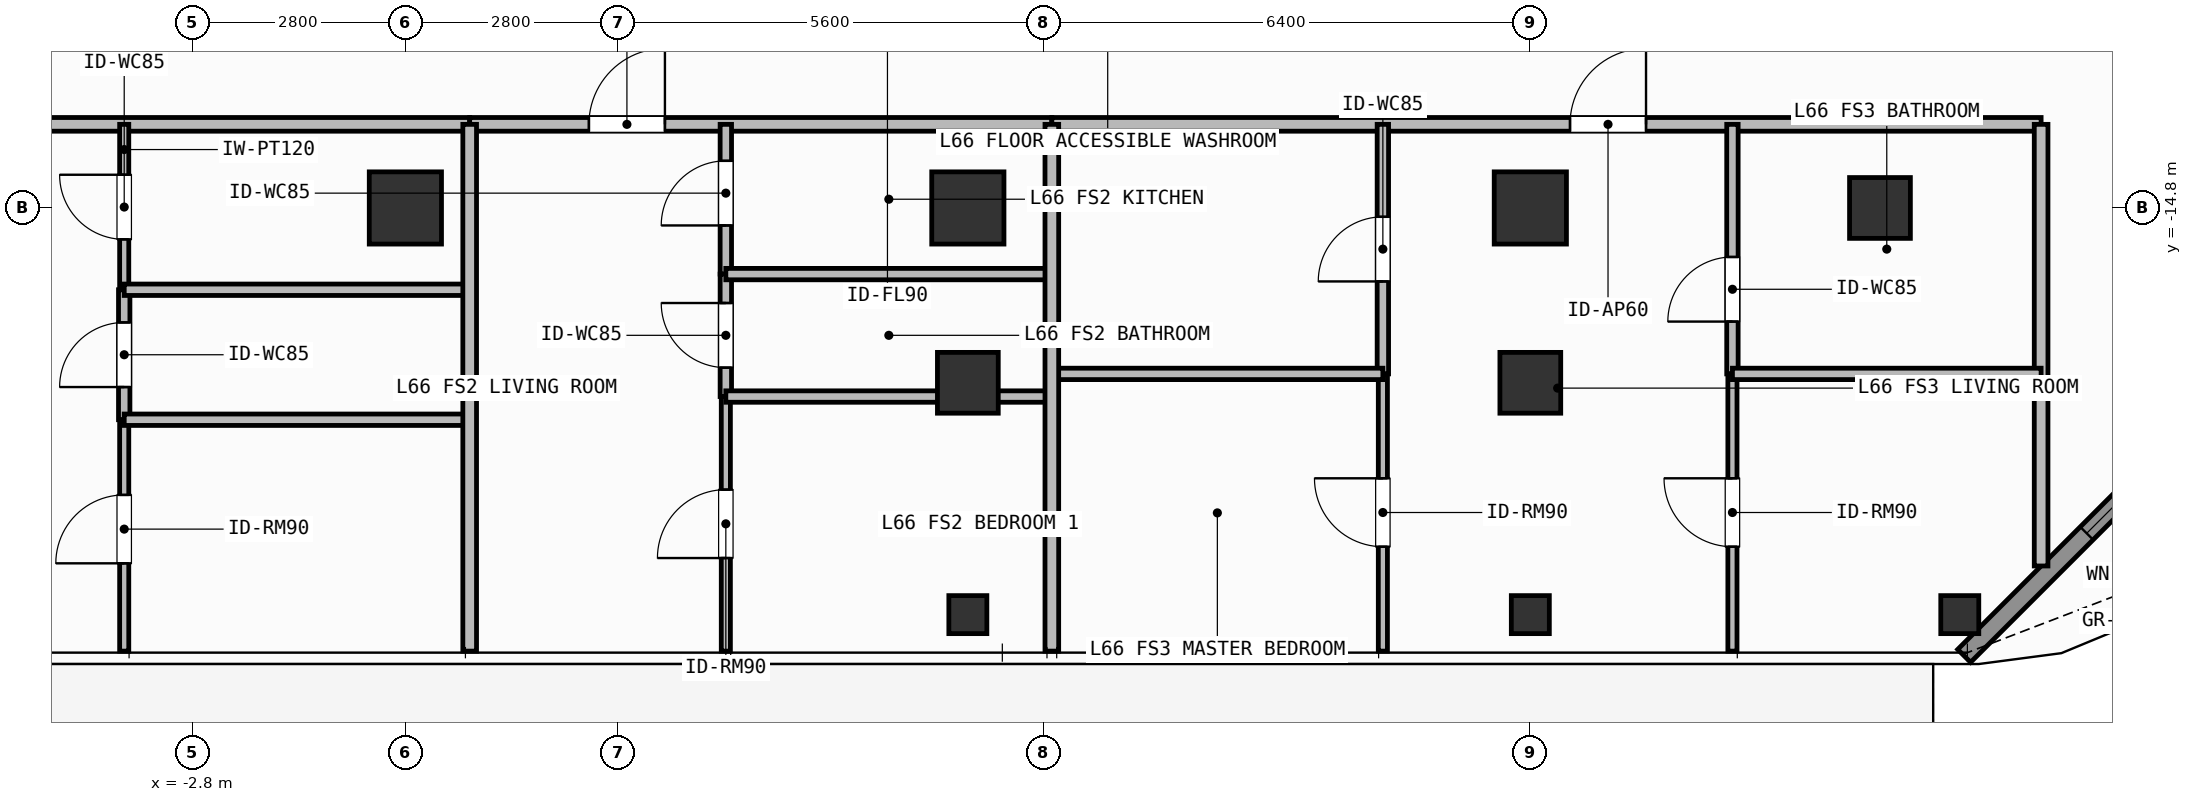
"""IFC4 building model, lengths in metres.
Left out: names, types, materials, properties, quantities, classifications, styles, units other than length and angle.
Written with IfcOpenShell. Run it as: python <this file> out.ifc"""

import sys

from ifc_helpers import new_model, si_unit, direction, frame, frame_2d, origin, origin_2d, place, context, subcontext, project, spatial, rectangle, hollow_rectangle, extrude, element, fill, save


model = new_model("IFC4")
c1 = context("Model", 3, precision=1e-05, world=origin(), true_north=direction((0.0, 1.0)))
c2 = subcontext(c1, "Body", "Model", "MODEL_VIEW")
j1 = project(units=[si_unit("LENGTHUNIT", "METRE"), si_unit("PLANEANGLEUNIT", "RADIAN")], contexts=[c1])
p1 = place(None, origin())
s1 = spatial("IfcSite", under=j1, at=p1, CompositionType="ELEMENT")
p2 = place(p1, origin())
s2 = spatial("IfcBuilding", under=s1, at=p2, CompositionType="ELEMENT")
p3 = place(p2, frame((0.0, 0.0, 270.3)))
s3 = spatial("IfcBuildingStorey", under=s2, at=p3, CompositionType="ELEMENT", Elevation=270.3)
for number, where, z_axis, x_axis in (
    (1, (0.0, -14.8, 0.0), (0.0, 0.0, 1.0), (1.0, 0.0, 0.0)),
    (2, (7.4, -14.8, 0.0), (0.0, 0.0, 1.0), (1.0, 0.0, 0.0)),
    (3, (14.8, -14.8, 0.0), (0.0, 0.0, 1.0), (1.0, 0.0, 0.0)),
):
    element("IfcColumn", number, at=place(p3, frame(where, z_axis=z_axis, x_axis=x_axis)), inside=s3, PredefinedType="COLUMN", context=c2, shape_type="SweptSolid", body=[
        extrude(rectangle(XDim=0.95, YDim=0.95, at=origin_2d()), origin(), (0.0, 0.0, 1.0), 3.9),
    ])
for number, where, z_axis, x_axis in (
    (4, (19.4, -14.8, 0.0), (0.0, 0.0, 1.0), (1.0, 0.0, 0.0)),
    (5, (7.4, -17.1, 0.0), (0.0, 0.0, 1.0), (1.0, 0.0, 0.0)),
    (6, (14.8, -17.1, 0.0), (0.0, 0.0, 1.0), (1.0, 0.0, 0.0)),
):
    element("IfcColumn", number, at=place(p3, frame(where, z_axis=z_axis, x_axis=x_axis)), inside=s3, PredefinedType="COLUMN", context=c2, shape_type="SweptSolid", body=[
        extrude(hollow_rectangle(XDim=0.8, YDim=0.8, WallThickness=0.036, at=origin_2d()), origin(), (0.0, 0.0, 1.0), 3.9),
    ])
for number, where, z_axis, x_axis in (
    (7, (20.45, -20.15, 0.0), (0.0, 0.0, 1.0), (1.0, 0.0, 0.0)),
    (8, (7.4, -20.15, 0.0), (0.0, 0.0, 1.0), (1.0, 0.0, 0.0)),
    (9, (14.8, -20.15, 0.0), (0.0, 0.0, 1.0), (1.0, 0.0, 0.0)),
):
    element("IfcColumn", number, at=place(p3, frame(where, z_axis=z_axis, x_axis=x_axis)), inside=s3, PredefinedType="COLUMN", context=c2, shape_type="SweptSolid", body=[
        extrude(hollow_rectangle(XDim=0.5, YDim=0.5, WallThickness=0.025, at=origin_2d()), origin(), (0.0, 0.0, 1.0), 3.9),
    ])
p4 = place(p3, frame((24.792, -16.408, 0.0), z_axis=(0.0, 0.0, 1.0), x_axis=(-0.707126925818, -0.707086635981, 0.0)))
e10 = element("IfcWall", 10, at=p4, inside=s3, PredefinedType="SOLIDWALL", context=c2, shape_type="SweptSolid", body=[
    extrude(rectangle(XDim=6.06, YDim=0.24, at=frame_2d((3.03, 0.0))), origin(), (0.0, 0.0, 1.0), 3.68),
])
p5 = place(p4, frame((2.28, 0.0, 0.8)))
e11 = element("IfcOpeningElement", 11, at=p5, cuts=e10, PredefinedType="OPENING", context=c2, shape_type="SweptSolid", body=[
    extrude(rectangle(XDim=1.5, YDim=1.85, at=frame_2d((0.75, 0.925))), frame((0.0, 0.13, 0.0), z_axis=(0.0, -1.0, 0.0), x_axis=(1.0, 0.0, 0.0)), (0.0, 0.0, 1.0), 0.26),
])
p6 = place(p3, frame((-13.72, -13.7, 0.0), z_axis=(0.0, 0.0, 1.0), x_axis=(1.0, 0.0, 0.0)))
e12 = element("IfcWall", 12, at=p6, inside=s3, PredefinedType="PARTITIONING", context=c2, shape_type="SweptSolid", body=[
    extrude(rectangle(XDim=14.566, YDim=0.18, at=frame_2d((7.283, 0.0))), origin(), (0.0, 0.0, 1.0), 3.68),
])
p7 = place(p6, frame((6.962, 0.0, 0.0)))
e13 = element("IfcOpeningElement", 13, at=p7, cuts=e12, PredefinedType="OPENING", context=c2, shape_type="SweptSolid", body=[
    extrude(rectangle(XDim=1.0, YDim=2.2, at=frame_2d((0.5, 1.1))), frame((0.0, 0.1, 0.0), z_axis=(0.0, -1.0, 0.0), x_axis=(1.0, 0.0, 0.0)), (0.0, 0.0, 1.0), 0.2),
])
p8 = place(p3, frame((-3.699, -17.586, 0.0), z_axis=(0.0, 0.0, 1.0), x_axis=(0.0, 1.0, 0.0)))
e14 = element("IfcWall", 14, at=p8, inside=s3, PredefinedType="PARTITIONING", context=c2, shape_type="SweptSolid", body=[
    extrude(rectangle(XDim=1.71, YDim=0.15, at=frame_2d((0.855, 0.0))), origin(), (0.0, 0.0, 1.0), 3.68),
])
p9 = place(p8, frame((0.43, 0.0, 0.0)))
e15 = element("IfcOpeningElement", 15, at=p9, cuts=e14, PredefinedType="OPENING", context=c2, shape_type="SweptSolid", body=[
    extrude(rectangle(XDim=0.85, YDim=2.1, at=frame_2d((0.425, 1.05))), frame((0.0, 0.085, 0.0), z_axis=(0.0, -1.0, 0.0), x_axis=(1.0, 0.0, 0.0)), (0.0, 0.0, 1.0), 0.17),
])
p10 = place(p3, frame((-3.699, -15.876, 0.0), z_axis=(0.0, 0.0, 1.0), x_axis=(0.0, 1.0, 0.0)))
e16 = element("IfcWall", 16, at=p10, inside=s3, PredefinedType="PARTITIONING", context=c2, shape_type="SweptSolid", body=[
    extrude(rectangle(XDim=2.176, YDim=0.12, at=frame_2d((1.088, 0.0))), origin(), (0.0, 0.0, 1.0), 3.68),
])
p11 = place(p10, frame((0.663, 0.0, 0.0)))
e17 = element("IfcOpeningElement", 17, at=p11, cuts=e16, PredefinedType="OPENING", context=c2, shape_type="SweptSolid", body=[
    extrude(rectangle(XDim=0.85, YDim=2.1, at=frame_2d((0.425, 1.05))), frame((0.0, 0.07, 0.0), z_axis=(0.0, -1.0, 0.0), x_axis=(1.0, 0.0, 0.0)), (0.0, 0.0, 1.0), 0.14),
])
p12 = place(p3, frame((-3.699, -20.63, 0.0), z_axis=(0.0, 0.0, 1.0), x_axis=(0.0, 1.0, 0.0)))
e18 = element("IfcWall", 18, at=p12, inside=s3, PredefinedType="PARTITIONING", context=c2, shape_type="SweptSolid", body=[
    extrude(rectangle(XDim=3.044, YDim=0.12, at=frame_2d((1.522, 0.0))), origin(), (0.0, 0.0, 1.0), 3.68),
])
p13 = place(p12, frame((1.155, 0.0, 0.0)))
e19 = element("IfcOpeningElement", 19, at=p13, cuts=e18, PredefinedType="OPENING", context=c2, shape_type="SweptSolid", body=[
    extrude(rectangle(XDim=0.9, YDim=2.1, at=frame_2d((0.45, 1.05))), frame((0.0, 0.07, 0.0), z_axis=(0.0, -1.0, 0.0), x_axis=(1.0, 0.0, 0.0)), (0.0, 0.0, 1.0), 0.14),
])
p14 = place(p3, frame((0.846, -13.7, 0.0), z_axis=(0.0, 0.0, 1.0), x_axis=(1.0, 0.0, 0.0)))
e20 = element("IfcWall", 20, at=p14, inside=s3, PredefinedType="PARTITIONING", context=c2, shape_type="SweptSolid", body=[
    extrude(rectangle(XDim=7.659, YDim=0.18, at=frame_2d((3.83, 0.0))), origin(), (0.0, 0.0, 1.0), 3.68),
])
p15 = place(p14, frame((1.569, 0.0, 0.0)))
e21 = element("IfcOpeningElement", 21, at=p15, cuts=e20, PredefinedType="OPENING", context=c2, shape_type="SweptSolid", body=[
    extrude(rectangle(XDim=1.0, YDim=2.2, at=frame_2d((0.5, 1.1))), frame((0.0, 0.1, 0.0), z_axis=(0.0, -1.0, 0.0), x_axis=(1.0, 0.0, 0.0)), (0.0, 0.0, 1.0), 0.2),
])
p16 = place(p3, frame((4.216, -15.67, 0.0), z_axis=(0.0, 0.0, 1.0), x_axis=(0.0, 1.0, 0.0)))
e22 = element("IfcWall", 22, at=p16, inside=s3, PredefinedType="PARTITIONING", context=c2, shape_type="SweptSolid", body=[
    extrude(rectangle(XDim=1.97, YDim=0.15, at=frame_2d((0.985, 0.0))), origin(), (0.0, 0.0, 1.0), 3.68),
])
p17 = place(p16, frame((0.64, 0.0, 0.0)))
e23 = element("IfcOpeningElement", 23, at=p17, cuts=e22, PredefinedType="OPENING", context=c2, shape_type="SweptSolid", body=[
    extrude(rectangle(XDim=0.85, YDim=2.1, at=frame_2d((0.425, 1.05))), frame((0.0, 0.085, 0.0), z_axis=(0.0, -1.0, 0.0), x_axis=(1.0, 0.0, 0.0)), (0.0, 0.0, 1.0), 0.17),
])
p18 = place(p3, frame((4.216, -17.281, 0.0), z_axis=(0.0, 0.0, 1.0), x_axis=(0.0, 1.0, 0.0)))
e24 = element("IfcWall", 24, at=p18, inside=s3, PredefinedType="PARTITIONING", context=c2, shape_type="SweptSolid", body=[
    extrude(rectangle(XDim=1.611, YDim=0.15, at=frame_2d((0.806, 0.0))), origin(), (0.0, 0.0, 1.0), 3.68),
])
p19 = place(p18, frame((0.381, 0.0, 0.0)))
e25 = element("IfcOpeningElement", 25, at=p19, cuts=e24, PredefinedType="OPENING", context=c2, shape_type="SweptSolid", body=[
    extrude(rectangle(XDim=0.85, YDim=2.1, at=frame_2d((0.425, 1.05))), frame((0.0, 0.085, 0.0), z_axis=(0.0, -1.0, 0.0), x_axis=(1.0, 0.0, 0.0)), (0.0, 0.0, 1.0), 0.17),
])
p20 = place(p3, frame((4.216, -20.63, 0.0), z_axis=(0.0, 0.0, 1.0), x_axis=(0.0, 1.0, 0.0)))
e26 = element("IfcWall", 26, at=p20, inside=s3, PredefinedType="PARTITIONING", context=c2, shape_type="SweptSolid", body=[
    extrude(rectangle(XDim=3.349, YDim=0.12, at=frame_2d((1.674, 0.0))), origin(), (0.0, 0.0, 1.0), 3.68),
])
p21 = place(p20, frame((1.225, 0.0, 0.0)))
e27 = element("IfcOpeningElement", 27, at=p21, cuts=e26, PredefinedType="OPENING", context=c2, shape_type="SweptSolid", body=[
    extrude(rectangle(XDim=0.9, YDim=2.1, at=frame_2d((0.45, 1.05))), frame((0.0, 0.07, 0.0), z_axis=(0.0, -1.0, 0.0), x_axis=(1.0, 0.0, 0.0)), (0.0, 0.0, 1.0), 0.14),
])
p22 = place(p3, frame((8.505, -13.7, 0.0), z_axis=(0.0, 0.0, 1.0), x_axis=(1.0, 0.0, 0.0)))
e28 = element("IfcWall", 28, at=p22, inside=s3, PredefinedType="PARTITIONING", context=c2, shape_type="SweptSolid", body=[
    extrude(rectangle(XDim=13.015, YDim=0.18, at=frame_2d((6.508, 0.0))), origin(), (0.0, 0.0, 1.0), 3.68),
])
p23 = place(p22, frame((6.817, 0.0, 0.0)))
e29 = element("IfcOpeningElement", 29, at=p23, cuts=e28, PredefinedType="OPENING", context=c2, shape_type="SweptSolid", body=[
    extrude(rectangle(XDim=1.0, YDim=2.2, at=frame_2d((0.5, 1.1))), frame((0.0, 0.1, 0.0), z_axis=(0.0, -1.0, 0.0), x_axis=(1.0, 0.0, 0.0)), (0.0, 0.0, 1.0), 0.2),
])
p24 = place(p3, frame((12.86, -16.983, 0.0), z_axis=(0.0, 0.0, 1.0), x_axis=(0.0, 1.0, 0.0)))
e30 = element("IfcWall", 30, at=p24, inside=s3, PredefinedType="PARTITIONING", context=c2, shape_type="SweptSolid", body=[
    extrude(rectangle(XDim=3.283, YDim=0.15, at=frame_2d((1.642, 0.0))), origin(), (0.0, 0.0, 1.0), 3.68),
])
p25 = place(p24, frame((1.217, 0.0, 0.0)))
e31 = element("IfcOpeningElement", 31, at=p25, cuts=e30, PredefinedType="OPENING", context=c2, shape_type="SweptSolid", body=[
    extrude(rectangle(XDim=0.85, YDim=2.1, at=frame_2d((0.425, 1.05))), frame((0.0, 0.085, 0.0), z_axis=(0.0, -1.0, 0.0), x_axis=(1.0, 0.0, 0.0)), (0.0, 0.0, 1.0), 0.17),
])
p26 = place(p3, frame((12.86, -20.63, 0.0), z_axis=(0.0, 0.0, 1.0), x_axis=(0.0, 1.0, 0.0)))
e32 = element("IfcWall", 32, at=p26, inside=s3, PredefinedType="PARTITIONING", context=c2, shape_type="SweptSolid", body=[
    extrude(rectangle(XDim=3.647, YDim=0.12, at=frame_2d((1.823, 0.0))), origin(), (0.0, 0.0, 1.0), 3.68),
])
p27 = place(p26, frame((1.374, 0.0, 0.0)))
e33 = element("IfcOpeningElement", 33, at=p27, cuts=e32, PredefinedType="OPENING", context=c2, shape_type="SweptSolid", body=[
    extrude(rectangle(XDim=0.9, YDim=2.1, at=frame_2d((0.45, 1.05))), frame((0.0, 0.07, 0.0), z_axis=(0.0, -1.0, 0.0), x_axis=(1.0, 0.0, 0.0)), (0.0, 0.0, 1.0), 0.14),
])
p28 = place(p3, frame((17.459, -16.983, 0.0), z_axis=(0.0, 0.0, 1.0), x_axis=(0.0, 1.0, 0.0)))
e34 = element("IfcWall", 34, at=p28, inside=s3, PredefinedType="PARTITIONING", context=c2, shape_type="SweptSolid", body=[
    extrude(rectangle(XDim=3.283, YDim=0.15, at=frame_2d((1.642, 0.0))), origin(), (0.0, 0.0, 1.0), 3.68),
])
p29 = place(p28, frame((0.688, 0.0, 0.0)))
e35 = element("IfcOpeningElement", 35, at=p29, cuts=e34, PredefinedType="OPENING", context=c2, shape_type="SweptSolid", body=[
    extrude(rectangle(XDim=0.85, YDim=2.1, at=frame_2d((0.425, 1.05))), frame((0.0, 0.085, 0.0), z_axis=(0.0, -1.0, 0.0), x_axis=(1.0, 0.0, 0.0)), (0.0, 0.0, 1.0), 0.17),
])
p30 = place(p3, frame((17.459, -20.63, 0.0), z_axis=(0.0, 0.0, 1.0), x_axis=(0.0, 1.0, 0.0)))
e36 = element("IfcWall", 36, at=p30, inside=s3, PredefinedType="PARTITIONING", context=c2, shape_type="SweptSolid", body=[
    extrude(rectangle(XDim=3.647, YDim=0.12, at=frame_2d((1.823, 0.0))), origin(), (0.0, 0.0, 1.0), 3.68),
])
p31 = place(p30, frame((1.374, 0.0, 0.0)))
e37 = element("IfcOpeningElement", 37, at=p31, cuts=e36, PredefinedType="OPENING", context=c2, shape_type="SweptSolid", body=[
    extrude(rectangle(XDim=0.9, YDim=2.1, at=frame_2d((0.45, 1.05))), frame((0.0, 0.07, 0.0), z_axis=(0.0, -1.0, 0.0), x_axis=(1.0, 0.0, 0.0)), (0.0, 0.0, 1.0), 0.14),
])
p32 = place(p3, frame((21.52, -19.51, 0.0), z_axis=(0.0, 0.0, 1.0), x_axis=(0.0, 1.0, 0.0)))
e38 = element("IfcWall", 38, at=p32, inside=s3, PredefinedType="PARTITIONING", context=c2, shape_type="SweptSolid", body=[
    extrude(rectangle(XDim=5.81, YDim=0.18, at=frame_2d((2.905, 0.0))), origin(), (0.0, 0.0, 1.0), 3.68),
])
for number, where, z_axis, x_axis in (
    (39, (-3.699, -15.876, 0.0), (0.0, 0.0, 1.0), (1.0, 0.0, 0.0)),
    (40, (-3.699, -17.586, 0.0), (0.0, 0.0, 1.0), (1.0, 0.0, 0.0)),
):
    element("IfcWall", number, at=place(p3, frame(where, z_axis=z_axis, x_axis=x_axis)), inside=s3, PredefinedType="PARTITIONING", context=c2, shape_type="SweptSolid", body=[
        extrude(rectangle(XDim=4.545, YDim=0.15, at=frame_2d((2.272, 0.0))), origin(), (0.0, 0.0, 1.0), 3.68),
    ])
p33 = place(p3, frame((4.216, -15.67, 0.0), z_axis=(0.0, 0.0, 1.0), x_axis=(1.0, 0.0, 0.0)))
e41 = element("IfcWall", 41, at=p33, inside=s3, PredefinedType="PARTITIONING", context=c2, shape_type="SweptSolid", body=[
    extrude(rectangle(XDim=4.289, YDim=0.15, at=frame_2d((2.145, 0.0))), origin(), (0.0, 0.0, 1.0), 3.68),
])
p34 = place(p3, frame((4.216, -17.281, 0.0), z_axis=(0.0, 0.0, 1.0), x_axis=(1.0, 0.0, 0.0)))
e42 = element("IfcWall", 42, at=p34, inside=s3, PredefinedType="PARTITIONING", context=c2, shape_type="SweptSolid", body=[
    extrude(rectangle(XDim=4.289, YDim=0.15, at=frame_2d((2.145, 0.0))), origin(), (0.0, 0.0, 1.0), 3.182),
])
p35 = place(p3, frame((0.846, -20.63, 0.0), z_axis=(0.0, 0.0, 1.0), x_axis=(0.0, 1.0, 0.0)))
e43 = element("IfcWall", 43, at=p35, inside=s3, PredefinedType="PARTITIONING", context=c2, shape_type="SweptSolid", body=[
    extrude(rectangle(XDim=6.93, YDim=0.18, at=frame_2d((3.465, 0.0))), origin(), (0.0, 0.0, 1.0), 3.68),
])
p36 = place(p3, frame((8.505, -16.983, 0.0), z_axis=(0.0, 0.0, 1.0), x_axis=(1.0, 0.0, 0.0)))
e44 = element("IfcWall", 44, at=p36, inside=s3, PredefinedType="PARTITIONING", context=c2, shape_type="SweptSolid", body=[
    extrude(rectangle(XDim=4.355, YDim=0.15, at=frame_2d((2.178, 0.0))), origin(), (0.0, 0.0, 1.0), 3.182),
])
p37 = place(p3, frame((17.459, -16.983, 0.0), z_axis=(0.0, 0.0, 1.0), x_axis=(1.0, 0.0, 0.0)))
e45 = element("IfcWall", 45, at=p37, inside=s3, PredefinedType="PARTITIONING", context=c2, shape_type="SweptSolid", body=[
    extrude(rectangle(XDim=4.061, YDim=0.15, at=frame_2d((2.031, 0.0))), origin(), (0.0, 0.0, 1.0), 3.68),
])
p38 = place(p3, frame((8.505, -20.63, 0.0), z_axis=(0.0, 0.0, 1.0), x_axis=(0.0, 1.0, 0.0)))
e46 = element("IfcWall", 46, at=p38, inside=s3, PredefinedType="PARTITIONING", context=c2, shape_type="SweptSolid", body=[
    extrude(rectangle(XDim=6.93, YDim=0.18, at=frame_2d((3.465, 0.0))), origin(), (0.0, 0.0, 1.0), 3.68),
])
p39 = place(p5, origin())
e47 = element("IfcWindow", 47, at=p39, inside=s3, PartitioningType="SINGLE_PANEL", PredefinedType="WINDOW", context=c2, shape_type="SweptSolid", body=[
    extrude(rectangle(XDim=1.5, YDim=1.85, at=frame_2d((0.75, 0.925))), frame((0.0, 0.03, 0.0), z_axis=(0.0, -1.0, 0.0), x_axis=(1.0, 0.0, 0.0)), (0.0, 0.0, 1.0), 0.06),
])
fill(e11, e47)
p40 = place(p9, origin())
e48 = element("IfcDoor", 48, at=p40, inside=s3, OperationType="SINGLE_SWING_LEFT", PredefinedType="DOOR", context=c2, shape_type="SweptSolid", body=[
    extrude(rectangle(XDim=0.85, YDim=2.1, at=frame_2d((0.425, 1.05))), frame((0.0, 0.025, 0.0), z_axis=(0.0, -1.0, 0.0), x_axis=(1.0, 0.0, 0.0)), (0.0, 0.0, 1.0), 0.05),
])
fill(e15, e48)
p41 = place(p11, origin())
e49 = element("IfcDoor", 49, at=p41, inside=s3, OperationType="SINGLE_SWING_RIGHT", PredefinedType="DOOR", context=c2, shape_type="SweptSolid", body=[
    extrude(rectangle(XDim=0.85, YDim=2.1, at=frame_2d((0.425, 1.05))), frame((0.0, 0.025, 0.0), z_axis=(0.0, -1.0, 0.0), x_axis=(1.0, 0.0, 0.0)), (0.0, 0.0, 1.0), 0.05),
])
fill(e17, e49)
p42 = place(p13, origin())
e50 = element("IfcDoor", 50, at=p42, inside=s3, OperationType="SINGLE_SWING_LEFT", PredefinedType="DOOR", context=c2, shape_type="SweptSolid", body=[
    extrude(rectangle(XDim=0.9, YDim=2.1, at=frame_2d((0.45, 1.05))), frame((0.0, 0.025, 0.0), z_axis=(0.0, -1.0, 0.0), x_axis=(1.0, 0.0, 0.0)), (0.0, 0.0, 1.0), 0.05),
])
fill(e19, e50)
p43 = place(p15, origin())
e51 = element("IfcDoor", 51, at=p43, inside=s3, OperationType="SINGLE_SWING_RIGHT", PredefinedType="DOOR", context=c2, shape_type="SweptSolid", body=[
    extrude(rectangle(XDim=1.0, YDim=2.2, at=frame_2d((0.5, 1.1))), frame((0.0, 0.025, 0.0), z_axis=(0.0, -1.0, 0.0), x_axis=(1.0, 0.0, 0.0)), (0.0, 0.0, 1.0), 0.05),
])
fill(e21, e51)
p44 = place(p17, origin())
e52 = element("IfcDoor", 52, at=p44, inside=s3, OperationType="SINGLE_SWING_LEFT", PredefinedType="DOOR", context=c2, shape_type="SweptSolid", body=[
    extrude(rectangle(XDim=0.85, YDim=2.1, at=frame_2d((0.425, 1.05))), frame((0.0, 0.025, 0.0), z_axis=(0.0, -1.0, 0.0), x_axis=(1.0, 0.0, 0.0)), (0.0, 0.0, 1.0), 0.05),
])
fill(e23, e52)
p45 = place(p19, origin())
e53 = element("IfcDoor", 53, at=p45, inside=s3, OperationType="SINGLE_SWING_RIGHT", PredefinedType="DOOR", context=c2, shape_type="SweptSolid", body=[
    extrude(rectangle(XDim=0.85, YDim=2.1, at=frame_2d((0.425, 1.05))), frame((0.0, 0.025, 0.0), z_axis=(0.0, -1.0, 0.0), x_axis=(1.0, 0.0, 0.0)), (0.0, 0.0, 1.0), 0.05),
])
fill(e25, e53)
p46 = place(p21, origin())
e54 = element("IfcDoor", 54, at=p46, inside=s3, OperationType="SINGLE_SWING_LEFT", PredefinedType="DOOR", context=c2, shape_type="SweptSolid", body=[
    extrude(rectangle(XDim=0.9, YDim=2.1, at=frame_2d((0.45, 1.05))), frame((0.0, 0.025, 0.0), z_axis=(0.0, -1.0, 0.0), x_axis=(1.0, 0.0, 0.0)), (0.0, 0.0, 1.0), 0.05),
])
fill(e27, e54)
p47 = place(p23, origin())
e55 = element("IfcDoor", 55, at=p47, inside=s3, OperationType="SINGLE_SWING_RIGHT", PredefinedType="DOOR", context=c2, shape_type="SweptSolid", body=[
    extrude(rectangle(XDim=1.0, YDim=2.2, at=frame_2d((0.5, 1.1))), frame((0.0, 0.025, 0.0), z_axis=(0.0, -1.0, 0.0), x_axis=(1.0, 0.0, 0.0)), (0.0, 0.0, 1.0), 0.05),
])
fill(e29, e55)
p48 = place(p25, origin())
e56 = element("IfcDoor", 56, at=p48, inside=s3, OperationType="SINGLE_SWING_LEFT", PredefinedType="DOOR", context=c2, shape_type="SweptSolid", body=[
    extrude(rectangle(XDim=0.85, YDim=2.1, at=frame_2d((0.425, 1.05))), frame((0.0, 0.025, 0.0), z_axis=(0.0, -1.0, 0.0), x_axis=(1.0, 0.0, 0.0)), (0.0, 0.0, 1.0), 0.05),
])
fill(e31, e56)
p49 = place(p27, origin())
e57 = element("IfcDoor", 57, at=p49, inside=s3, OperationType="SINGLE_SWING_RIGHT", PredefinedType="DOOR", context=c2, shape_type="SweptSolid", body=[
    extrude(rectangle(XDim=0.9, YDim=2.1, at=frame_2d((0.45, 1.05))), frame((0.0, 0.025, 0.0), z_axis=(0.0, -1.0, 0.0), x_axis=(1.0, 0.0, 0.0)), (0.0, 0.0, 1.0), 0.05),
])
fill(e33, e57)
p50 = place(p29, origin())
e58 = element("IfcDoor", 58, at=p50, inside=s3, OperationType="SINGLE_SWING_LEFT", PredefinedType="DOOR", context=c2, shape_type="SweptSolid", body=[
    extrude(rectangle(XDim=0.85, YDim=2.1, at=frame_2d((0.425, 1.05))), frame((0.0, 0.025, 0.0), z_axis=(0.0, -1.0, 0.0), x_axis=(1.0, 0.0, 0.0)), (0.0, 0.0, 1.0), 0.05),
])
fill(e35, e58)
p51 = place(p31, origin())
e59 = element("IfcDoor", 59, at=p51, inside=s3, OperationType="SINGLE_SWING_RIGHT", PredefinedType="DOOR", context=c2, shape_type="SweptSolid", body=[
    extrude(rectangle(XDim=0.9, YDim=2.1, at=frame_2d((0.45, 1.05))), frame((0.0, 0.025, 0.0), z_axis=(0.0, -1.0, 0.0), x_axis=(1.0, 0.0, 0.0)), (0.0, 0.0, 1.0), 0.05),
])
fill(e37, e59)
save(model, sys.argv[1])
